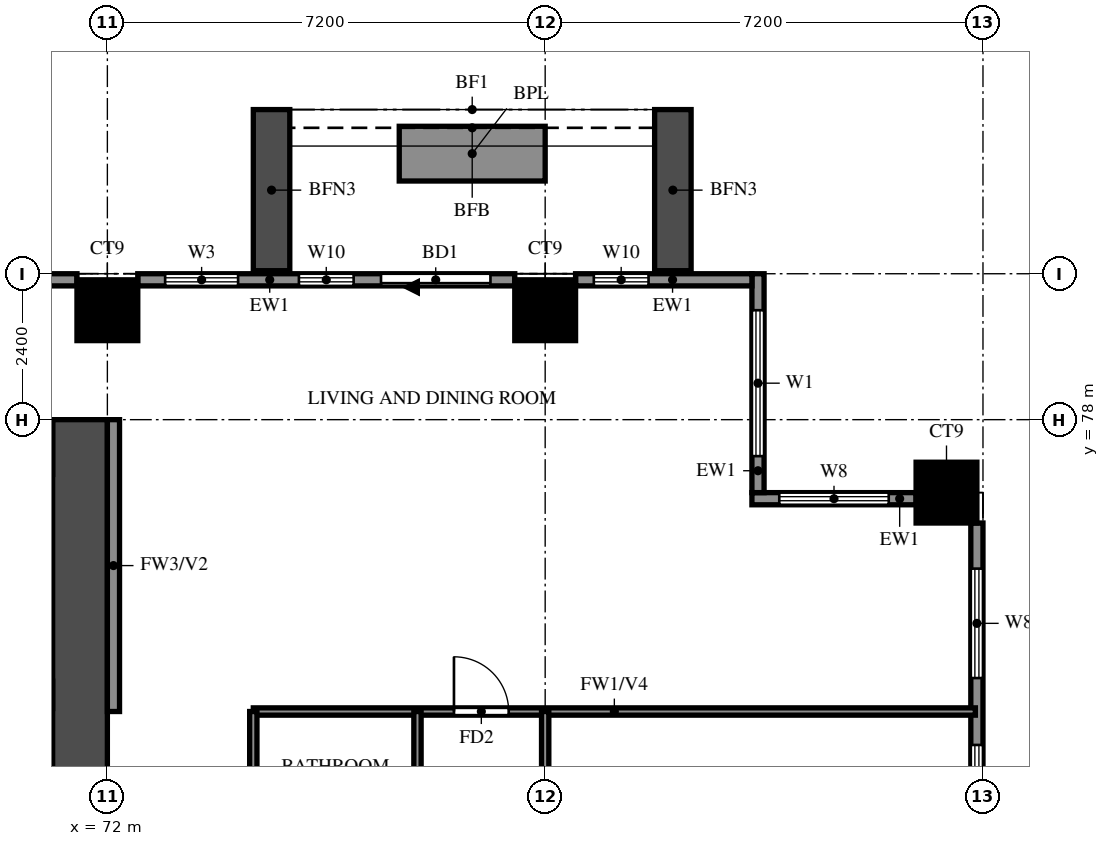
"""IFC4 building model, lengths in metres.
Left out: names, types, materials, properties, quantities, classifications, styles, units other than length and angle.
Written with IfcOpenShell. Run it as: python <this file> out.ifc"""

import sys

from ifc_helpers import new_model, si_unit, direction, frame, frame_2d, origin, origin_2d, place, context, subcontext, project, spatial, rectangle, extrude, source, transform, mapped, element, fill, save


model = new_model("IFC4")
c1 = context("Model", 3, precision=1e-05, world=origin(), true_north=direction((0.0, 1.0)))
c2 = subcontext(c1, "Body", "Model", "MODEL_VIEW")
j1 = project(units=[si_unit("LENGTHUNIT", "METRE"), si_unit("PLANEANGLEUNIT", "RADIAN")], contexts=[c1])
p1 = place(None, origin())
s1 = spatial("IfcSite", under=j1, at=p1, CompositionType="ELEMENT")
p2 = place(p1, origin())
s2 = spatial("IfcBuilding", under=s1, at=p2, CompositionType="ELEMENT")
p3 = place(p2, frame((0.0, 0.0, 76.0)))
s3 = spatial("IfcBuildingStorey", under=s2, at=p3, CompositionType="ELEMENT", Elevation=76.0)
m1 = source(origin(), c2, "Body", "SweptSolid", [
    extrude(rectangle(XDim=1.0, YDim=1.0, at=origin_2d()), origin(), (0.0, 0.0, 1.0), 3.18),
])
for number, where, z_axis, x_axis in (
    (1, (85.8, 76.8, 0.0), (0.0, 0.0, 1.0), (1.0, 0.0, 0.0)),
    (2, (72.0, 79.8, 0.0), (0.0, 0.0, 1.0), (1.0, 0.0, 0.0)),
    (3, (79.2, 79.8, 0.0), (0.0, 0.0, 1.0), (1.0, 0.0, 0.0)),
):
    element("IfcColumn", number, at=place(p3, frame(where, z_axis=z_axis, x_axis=x_axis)), inside=s3, PredefinedType="COLUMN", context=c2, shape_type="MappedRepresentation", body=[
        mapped(m1, transform((0.0, 0.0, 0.0))),
    ])
p4 = place(p3, frame((71.55, 66.0, 0.0), z_axis=(0.0, 0.0, 1.0), x_axis=(0.0, 1.0, 0.0)))
e4 = element("IfcWall", 4, at=p4, inside=s3, PredefinedType="SHEAR", context=c2, shape_type="SweptSolid", body=[
    extrude(rectangle(XDim=12.0, YDim=0.9, at=frame_2d((6.0, 0.0))), origin(), (0.0, 0.0, 1.0), 3.18),
])
p5 = place(p3, frame((29.7, 77.55, 0.0), z_axis=(0.0, 0.0, 1.0), x_axis=(1.0, 0.0, 0.0)))
e5 = element("IfcWall", 5, at=p5, inside=s3, PredefinedType="SHEAR", context=c2, shape_type="SweptSolid", body=[
    extrude(rectangle(XDim=41.4, YDim=0.9, at=frame_2d((20.7, 0.0))), origin(), (0.0, 0.0, 1.0), 3.18),
])
p6 = place(p3, frame((86.3, 70.1, 0.0), z_axis=(0.0, 0.0, 1.0), x_axis=(0.0, 1.0, 0.0)))
e6 = element("IfcWall", 6, at=p6, inside=s3, PredefinedType="SOLIDWALL", context=c2, shape_type="SweptSolid", body=[
    extrude(rectangle(XDim=6.2, YDim=0.2, at=frame_2d((3.1, 0.0))), origin(), (0.0, 0.0, 1.0), 3.18),
])
p7 = place(p6, frame((0.75, 0.0, 0.6)))
e7 = element("IfcOpeningElement", 7, at=p7, cuts=e6, PredefinedType="OPENING", context=c2, shape_type="SweptSolid", body=[
    extrude(rectangle(XDim=1.8, YDim=2.4, at=frame_2d((0.9, 1.2))), frame((0.0, 0.11, 0.0), z_axis=(0.0, -1.0, 0.0), x_axis=(1.0, 0.0, 0.0)), (0.0, 0.0, 1.0), 0.22),
])
p8 = place(p6, frame((3.65, 0.0, 0.6)))
e8 = element("IfcOpeningElement", 8, at=p8, cuts=e6, PredefinedType="OPENING", context=c2, shape_type="SweptSolid", body=[
    extrude(rectangle(XDim=1.8, YDim=2.4, at=frame_2d((0.9, 1.2))), frame((0.0, 0.11, 0.0), z_axis=(0.0, -1.0, 0.0), x_axis=(1.0, 0.0, 0.0)), (0.0, 0.0, 1.0), 0.22),
])
p9 = place(p3, frame((85.3, 76.7, 0.0), z_axis=(0.0, 0.0, 1.0), x_axis=(-1.0, 0.0, 0.0)))
e9 = element("IfcWall", 9, at=p9, inside=s3, PredefinedType="SOLIDWALL", context=c2, shape_type="SweptSolid", body=[
    extrude(rectangle(XDim=2.7, YDim=0.2, at=frame_2d((1.35, 0.0))), origin(), (0.0, 0.0, 1.0), 3.18),
])
p10 = place(p9, frame((0.45, 0.0, 0.6)))
e10 = element("IfcOpeningElement", 10, at=p10, cuts=e9, PredefinedType="OPENING", context=c2, shape_type="SweptSolid", body=[
    extrude(rectangle(XDim=1.8, YDim=2.4, at=frame_2d((0.9, 1.2))), frame((0.0, 0.11, 0.0), z_axis=(0.0, -1.0, 0.0), x_axis=(1.0, 0.0, 0.0)), (0.0, 0.0, 1.0), 0.22),
])
p11 = place(p3, frame((82.7, 76.8, 0.0), z_axis=(0.0, 0.0, 1.0), x_axis=(0.0, 1.0, 0.0)))
e11 = element("IfcWall", 11, at=p11, inside=s3, PredefinedType="SOLIDWALL", context=c2, shape_type="SweptSolid", body=[
    extrude(rectangle(XDim=3.6, YDim=0.2, at=frame_2d((1.8, 0.0))), origin(), (0.0, 0.0, 1.0), 3.18),
])
p12 = place(p11, frame((0.6, 0.0, 0.6)))
e12 = element("IfcOpeningElement", 12, at=p12, cuts=e11, PredefinedType="OPENING", context=c2, shape_type="SweptSolid", body=[
    extrude(rectangle(XDim=2.4, YDim=2.4, at=frame_2d((1.2, 1.2))), frame((0.0, 0.11, 0.0), z_axis=(0.0, -1.0, 0.0), x_axis=(1.0, 0.0, 0.0)), (0.0, 0.0, 1.0), 0.22),
])
p13 = place(p3, frame((82.6, 80.3, 0.0), z_axis=(0.0, 0.0, 1.0), x_axis=(-1.0, 0.0, 0.0)))
e13 = element("IfcWall", 13, at=p13, inside=s3, PredefinedType="SOLIDWALL", context=c2, shape_type="SweptSolid", body=[
    extrude(rectangle(XDim=2.9, YDim=0.2, at=frame_2d((1.45, 0.0))), origin(), (0.0, 0.0, 1.0), 3.18),
])
p14 = place(p13, frame((1.7, 0.0, 0.6)))
e14 = element("IfcOpeningElement", 14, at=p14, cuts=e13, PredefinedType="OPENING", context=c2, shape_type="SweptSolid", body=[
    extrude(rectangle(XDim=0.9, YDim=2.4, at=frame_2d((0.45, 1.2))), frame((0.0, 0.11, 0.0), z_axis=(0.0, -1.0, 0.0), x_axis=(1.0, 0.0, 0.0)), (0.0, 0.0, 1.0), 0.22),
])
p15 = place(p3, frame((78.7, 80.3, 0.0), z_axis=(0.0, 0.0, 1.0), x_axis=(-1.0, 0.0, 0.0)))
e15 = element("IfcWall", 15, at=p15, inside=s3, PredefinedType="SOLIDWALL", context=c2, shape_type="SweptSolid", body=[
    extrude(rectangle(XDim=6.2, YDim=0.2, at=frame_2d((3.1, 0.0))), origin(), (0.0, 0.0, 1.0), 3.18),
])
p16 = place(p15, frame((0.4, 0.0, 0.0)))
e16 = element("IfcOpeningElement", 16, at=p16, cuts=e15, PredefinedType="OPENING", context=c2, shape_type="SweptSolid", body=[
    extrude(rectangle(XDim=1.8, YDim=2.4, at=frame_2d((0.9, 1.2))), frame((0.0, 0.11, 0.0), z_axis=(0.0, -1.0, 0.0), x_axis=(1.0, 0.0, 0.0)), (0.0, 0.0, 1.0), 0.22),
])
p17 = place(p15, frame((2.65, 0.0, 0.6)))
e17 = element("IfcOpeningElement", 17, at=p17, cuts=e15, PredefinedType="OPENING", context=c2, shape_type="SweptSolid", body=[
    extrude(rectangle(XDim=0.9, YDim=2.4, at=frame_2d((0.45, 1.2))), frame((0.0, 0.11, 0.0), z_axis=(0.0, -1.0, 0.0), x_axis=(1.0, 0.0, 0.0)), (0.0, 0.0, 1.0), 0.22),
])
p18 = place(p15, frame((4.55, 0.0, 0.6)))
e18 = element("IfcOpeningElement", 18, at=p18, cuts=e15, PredefinedType="OPENING", context=c2, shape_type="SweptSolid", body=[
    extrude(rectangle(XDim=1.2, YDim=2.4, at=frame_2d((0.6, 1.2))), frame((0.0, 0.11, 0.0), z_axis=(0.0, -1.0, 0.0), x_axis=(1.0, 0.0, 0.0)), (0.0, 0.0, 1.0), 0.22),
])
p19 = place(p3, frame((71.5, 80.3, 0.0), z_axis=(0.0, 0.0, 1.0), x_axis=(-1.0, 0.0, 0.0)))
e19 = element("IfcWall", 19, at=p19, inside=s3, PredefinedType="SOLIDWALL", context=c2, shape_type="SweptSolid", body=[
    extrude(rectangle(XDim=6.2, YDim=0.2, at=frame_2d((3.1, 0.0))), origin(), (0.0, 0.0, 1.0), 3.18),
])
for number, where, z_axis, x_axis in (
    (20, (81.3, 80.45, 0.0), (0.0, 0.0, 1.0), (0.0, 1.0, 0.0)),
    (21, (74.7, 80.45, 0.0), (0.0, 0.0, 1.0), (0.0, 1.0, 0.0)),
):
    element("IfcWall", number, at=place(p3, frame(where, z_axis=z_axis, x_axis=x_axis)), inside=s3, PredefinedType="SOLIDWALL", context=c2, shape_type="SweptSolid", body=[
        extrude(rectangle(XDim=2.65, YDim=0.6, at=frame_2d((1.325, 0.0))), origin(), (0.0, 0.0, 1.0), 2.85),
    ])
p20 = place(p3, frame((79.2, 82.375, 0.0), z_axis=(0.0, 0.0, 1.0), x_axis=(-1.0, 0.0, 0.0)))
e22 = element("IfcWall", 22, at=p20, inside=s3, PredefinedType="SOLIDWALL", context=c2, shape_type="SweptSolid", body=[
    extrude(rectangle(XDim=2.4, YDim=0.9, at=frame_2d((1.2, 0.0))), origin(), (0.0, 0.0, 1.0), 0.9),
])
p21 = place(p3, frame((72.1, 73.2, 0.0), z_axis=(0.0, 0.0, 1.0), x_axis=(0.0, 1.0, 0.0)))
e23 = element("IfcWall", 23, at=p21, inside=s3, PredefinedType="SOLIDWALL", context=c2, shape_type="SweptSolid", body=[
    extrude(rectangle(XDim=4.8, YDim=0.2, at=frame_2d((2.4, 0.0))), origin(), (0.0, 0.0, 1.0), 3.18),
])
p22 = place(p3, frame((74.4, 73.2, 0.0), z_axis=(0.0, 0.0, 1.0), x_axis=(1.0, 0.0, 0.0)))
e24 = element("IfcWall", 24, at=p22, inside=s3, PredefinedType="PARTITIONING", context=c2, shape_type="SweptSolid", body=[
    extrude(rectangle(XDim=11.875, YDim=0.12, at=frame_2d((5.938, 0.0))), origin(), (0.0, 0.0, 1.0), 2.28),
])
p23 = place(p22, frame((3.3, 0.0, 0.0)))
e25 = element("IfcOpeningElement", 25, at=p23, cuts=e24, PredefinedType="OPENING", context=c2, shape_type="SweptSolid", body=[
    extrude(rectangle(XDim=0.9, YDim=2.1, at=frame_2d((0.45, 1.05))), frame((0.0, 0.07, 0.0), z_axis=(0.0, -1.0, 0.0), x_axis=(1.0, 0.0, 0.0)), (0.0, 0.0, 1.0), 0.14),
])
p24 = place(p3, frame((74.4, 69.62, 0.0), z_axis=(0.0, 0.0, 1.0), x_axis=(0.0, 1.0, 0.0)))
e26 = element("IfcWall", 26, at=p24, inside=s3, PredefinedType="PARTITIONING", context=c2, shape_type="SweptSolid", body=[
    extrude(rectangle(XDim=3.58, YDim=0.12, at=frame_2d((1.79, 0.0))), origin(), (0.0, 0.0, 1.0), 3.18),
])
p25 = place(p3, frame((77.1, 64.8, 0.0), z_axis=(0.0, 0.0, 1.0), x_axis=(0.0, 1.0, 0.0)))
e27 = element("IfcWall", 27, at=p25, inside=s3, PredefinedType="PARTITIONING", context=c2, shape_type="SweptSolid", body=[
    extrude(rectangle(XDim=8.4, YDim=0.12, at=frame_2d((4.2, 0.0))), origin(), (0.0, 0.0, 1.0), 3.18),
])
p26 = place(p25, frame((1.875, 0.0, 0.0)))
e28 = element("IfcOpeningElement", 28, at=p26, cuts=e27, PredefinedType="OPENING", context=c2, shape_type="SweptSolid", body=[
    extrude(rectangle(XDim=0.9, YDim=2.1, at=frame_2d((0.45, 1.05))), frame((0.0, 0.07, 0.0), z_axis=(0.0, -1.0, 0.0), x_axis=(1.0, 0.0, 0.0)), (0.0, 0.0, 1.0), 0.14),
])
p27 = place(p25, frame((6.125, 0.0, 0.0)))
e29 = element("IfcOpeningElement", 29, at=p27, cuts=e27, PredefinedType="OPENING", context=c2, shape_type="SweptSolid", body=[
    extrude(rectangle(XDim=0.8, YDim=2.1, at=frame_2d((0.4, 1.05))), frame((0.0, 0.07, 0.0), z_axis=(0.0, -1.0, 0.0), x_axis=(1.0, 0.0, 0.0)), (0.0, 0.0, 1.0), 0.14),
])
p28 = place(p3, frame((79.2, 48.125, 0.0), z_axis=(0.0, 0.0, 1.0), x_axis=(0.0, 1.0, 0.0)))
e30 = element("IfcWall", 30, at=p28, inside=s3, PredefinedType="PARTITIONING", context=c2, shape_type="SweptSolid", body=[
    extrude(rectangle(XDim=25.075, YDim=0.12, at=frame_2d((12.538, 0.0))), origin(), (0.0, 0.0, 1.0), 3.18),
])
p29 = place(p28, frame((2.788, 0.0, 0.0)))
e31 = element("IfcOpeningElement", 31, at=p29, cuts=e30, PredefinedType="OPENING", context=c2, shape_type="SweptSolid", body=[
    extrude(rectangle(XDim=1.5, YDim=2.1, at=frame_2d((0.75, 1.05))), frame((0.0, 0.07, 0.0), z_axis=(0.0, -1.0, 0.0), x_axis=(1.0, 0.0, 0.0)), (0.0, 0.0, 1.0), 0.14),
])
p30 = place(p28, frame((8.425, 0.0, 0.0)))
e32 = element("IfcOpeningElement", 32, at=p30, cuts=e30, PredefinedType="OPENING", context=c2, shape_type="SweptSolid", body=[
    extrude(rectangle(XDim=0.9, YDim=2.1, at=frame_2d((0.45, 1.05))), frame((0.0, 0.07, 0.0), z_axis=(0.0, -1.0, 0.0), x_axis=(1.0, 0.0, 0.0)), (0.0, 0.0, 1.0), 0.14),
])
p31 = place(p28, frame((12.025, 0.0, 0.0)))
e33 = element("IfcOpeningElement", 33, at=p31, cuts=e30, PredefinedType="OPENING", context=c2, shape_type="SweptSolid", body=[
    extrude(rectangle(XDim=0.9, YDim=2.1, at=frame_2d((0.45, 1.05))), frame((0.0, 0.07, 0.0), z_axis=(0.0, -1.0, 0.0), x_axis=(1.0, 0.0, 0.0)), (0.0, 0.0, 1.0), 0.14),
])
p32 = place(p28, frame((15.625, 0.0, 0.0)))
e34 = element("IfcOpeningElement", 34, at=p32, cuts=e30, PredefinedType="OPENING", context=c2, shape_type="SweptSolid", body=[
    extrude(rectangle(XDim=0.9, YDim=2.1, at=frame_2d((0.45, 1.05))), frame((0.0, 0.07, 0.0), z_axis=(0.0, -1.0, 0.0), x_axis=(1.0, 0.0, 0.0)), (0.0, 0.0, 1.0), 0.14),
])
p33 = place(p28, frame((19.225, 0.0, 0.0)))
e35 = element("IfcOpeningElement", 35, at=p33, cuts=e30, PredefinedType="OPENING", context=c2, shape_type="SweptSolid", body=[
    extrude(rectangle(XDim=0.9, YDim=2.1, at=frame_2d((0.45, 1.05))), frame((0.0, 0.07, 0.0), z_axis=(0.0, -1.0, 0.0), x_axis=(1.0, 0.0, 0.0)), (0.0, 0.0, 1.0), 0.14),
])
p34 = place(p28, frame((22.825, 0.0, 0.0)))
e36 = element("IfcOpeningElement", 36, at=p34, cuts=e30, PredefinedType="OPENING", context=c2, shape_type="SweptSolid", body=[
    extrude(rectangle(XDim=0.9, YDim=2.1, at=frame_2d((0.45, 1.05))), frame((0.0, 0.07, 0.0), z_axis=(0.0, -1.0, 0.0), x_axis=(1.0, 0.0, 0.0)), (0.0, 0.0, 1.0), 0.14),
])
p35 = place(p7, origin())
e37 = element("IfcWindow", 37, at=p35, inside=s3, PartitioningType="DOUBLE_PANEL_VERTICAL", PredefinedType="WINDOW", context=c2, shape_type="SweptSolid", body=[
    extrude(rectangle(XDim=1.8, YDim=2.4, at=frame_2d((0.9, 1.2))), frame((0.0, 0.03, 0.0), z_axis=(0.0, -1.0, 0.0), x_axis=(1.0, 0.0, 0.0)), (0.0, 0.0, 1.0), 0.06),
])
fill(e7, e37)
p36 = place(p8, origin())
e38 = element("IfcWindow", 38, at=p36, inside=s3, PartitioningType="DOUBLE_PANEL_VERTICAL", PredefinedType="WINDOW", context=c2, shape_type="SweptSolid", body=[
    extrude(rectangle(XDim=1.8, YDim=2.4, at=frame_2d((0.9, 1.2))), frame((0.0, 0.03, 0.0), z_axis=(0.0, -1.0, 0.0), x_axis=(1.0, 0.0, 0.0)), (0.0, 0.0, 1.0), 0.06),
])
fill(e8, e38)
p37 = place(p10, origin())
e39 = element("IfcWindow", 39, at=p37, inside=s3, PartitioningType="DOUBLE_PANEL_VERTICAL", PredefinedType="WINDOW", context=c2, shape_type="SweptSolid", body=[
    extrude(rectangle(XDim=1.8, YDim=2.4, at=frame_2d((0.9, 1.2))), frame((0.0, 0.03, 0.0), z_axis=(0.0, -1.0, 0.0), x_axis=(1.0, 0.0, 0.0)), (0.0, 0.0, 1.0), 0.06),
])
fill(e10, e39)
p38 = place(p12, origin())
e40 = element("IfcWindow", 40, at=p38, inside=s3, PartitioningType="DOUBLE_PANEL_VERTICAL", PredefinedType="WINDOW", context=c2, shape_type="SweptSolid", body=[
    extrude(rectangle(XDim=2.4, YDim=2.4, at=frame_2d((1.2, 1.2))), frame((0.0, 0.03, 0.0), z_axis=(0.0, -1.0, 0.0), x_axis=(1.0, 0.0, 0.0)), (0.0, 0.0, 1.0), 0.06),
])
fill(e12, e40)
p39 = place(p14, origin())
e41 = element("IfcWindow", 41, at=p39, inside=s3, PartitioningType="SINGLE_PANEL", PredefinedType="WINDOW", context=c2, shape_type="SweptSolid", body=[
    extrude(rectangle(XDim=0.9, YDim=2.4, at=frame_2d((0.45, 1.2))), frame((0.0, 0.03, 0.0), z_axis=(0.0, -1.0, 0.0), x_axis=(1.0, 0.0, 0.0)), (0.0, 0.0, 1.0), 0.06),
])
fill(e14, e41)
p40 = place(p16, origin())
e42 = element("IfcDoor", 42, at=p40, inside=s3, OperationType="DOUBLE_DOOR_SLIDING", PredefinedType="DOOR", context=c2, shape_type="SweptSolid", body=[
    extrude(rectangle(XDim=1.8, YDim=2.4, at=frame_2d((0.9, 1.2))), frame((0.0, 0.025, 0.0), z_axis=(0.0, -1.0, 0.0), x_axis=(1.0, 0.0, 0.0)), (0.0, 0.0, 1.0), 0.05),
])
fill(e16, e42)
p41 = place(p17, origin())
e43 = element("IfcWindow", 43, at=p41, inside=s3, PartitioningType="SINGLE_PANEL", PredefinedType="WINDOW", context=c2, shape_type="SweptSolid", body=[
    extrude(rectangle(XDim=0.9, YDim=2.4, at=frame_2d((0.45, 1.2))), frame((0.0, 0.03, 0.0), z_axis=(0.0, -1.0, 0.0), x_axis=(1.0, 0.0, 0.0)), (0.0, 0.0, 1.0), 0.06),
])
fill(e17, e43)
p42 = place(p18, origin())
e44 = element("IfcWindow", 44, at=p42, inside=s3, PartitioningType="SINGLE_PANEL", PredefinedType="WINDOW", context=c2, shape_type="SweptSolid", body=[
    extrude(rectangle(XDim=1.2, YDim=2.4, at=frame_2d((0.6, 1.2))), frame((0.0, 0.03, 0.0), z_axis=(0.0, -1.0, 0.0), x_axis=(1.0, 0.0, 0.0)), (0.0, 0.0, 1.0), 0.06),
])
fill(e18, e44)
p43 = place(p23, origin())
e45 = element("IfcDoor", 45, at=p43, inside=s3, OperationType="SINGLE_SWING_LEFT", PredefinedType="DOOR", context=c2, shape_type="SweptSolid", body=[
    extrude(rectangle(XDim=0.9, YDim=2.1, at=frame_2d((0.45, 1.05))), frame((0.0, 0.025, 0.0), z_axis=(0.0, -1.0, 0.0), x_axis=(1.0, 0.0, 0.0)), (0.0, 0.0, 1.0), 0.05),
])
fill(e25, e45)
save(model, sys.argv[1])
